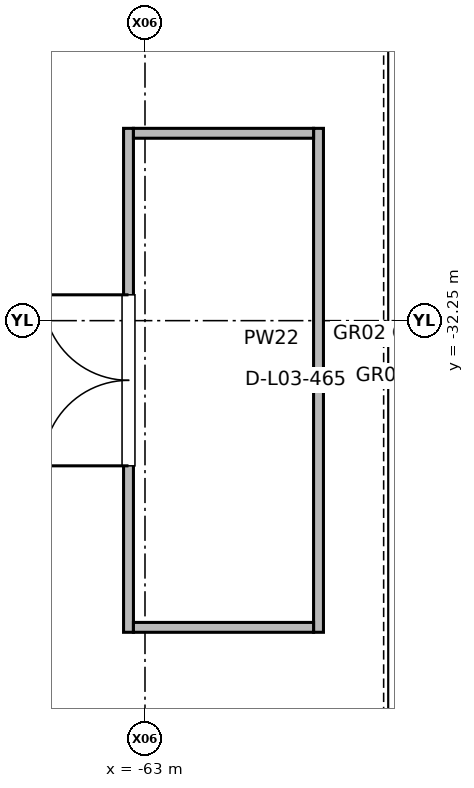
"""IFC4 building model, lengths in metres.
Left out: names, types, materials, properties, quantities, classifications, styles, units other than length and angle.
Written with IfcOpenShell. Run it as: python <this file> out.ifc"""

import sys

from ifc_helpers import new_model, si_unit, direction, frame, frame_2d, origin, place, context, subcontext, project, spatial, rectangle, extrude, element, fill, save


model = new_model("IFC4")
c1 = context("Model", 3, precision=1e-05, world=origin(), true_north=direction((0.0, 1.0)))
c2 = subcontext(c1, "Body", "Model", "MODEL_VIEW")
j1 = project(units=[si_unit("LENGTHUNIT", "METRE"), si_unit("PLANEANGLEUNIT", "RADIAN")], contexts=[c1])
p1 = place(None, origin())
s1 = spatial("IfcSite", under=j1, at=p1, CompositionType="ELEMENT")
p2 = place(p1, origin())
s2 = spatial("IfcBuilding", under=s1, at=p2, CompositionType="ELEMENT")
p3 = place(p2, frame((0.0, 0.0, 11.4)))
s3 = spatial("IfcBuildingStorey", under=s2, at=p3, CompositionType="ELEMENT", Elevation=11.4)
p4 = place(p3, frame((-63.217, -36.35, 0.0), z_axis=(0.0, 0.0, 1.0), x_axis=(0.0, 1.0, 0.0)))
e1 = element("IfcWall", 1, at=p4, inside=s3, PredefinedType="PARTITIONING", context=c2, shape_type="SweptSolid", body=[
    extrude(rectangle(XDim=6.63, YDim=0.13, at=frame_2d((3.315, 0.0))), origin(), (0.0, 0.0, 1.0), 2.755),
])
p5 = place(p4, frame((2.19, 0.0, 0.0)))
e2 = element("IfcOpeningElement", 2, at=p5, cuts=e1, PredefinedType="OPENING", context=c2, shape_type="SweptSolid", body=[
    extrude(rectangle(XDim=2.25, YDim=2.45, at=frame_2d((1.125, 1.225))), frame((0.0, 0.075, 0.0), z_axis=(0.0, -1.0, 0.0), x_axis=(1.0, 0.0, 0.0)), (0.0, 0.0, 1.0), 0.15),
])
p6 = place(p3, frame((-60.717, -36.35, 0.0), z_axis=(0.0, 0.0, 1.0), x_axis=(0.0, 1.0, 0.0)))
e3 = element("IfcWall", 3, at=p6, inside=s3, PredefinedType="PARTITIONING", context=c2, shape_type="SweptSolid", body=[
    extrude(rectangle(XDim=6.63, YDim=0.13, at=frame_2d((3.315, 0.0))), origin(), (0.0, 0.0, 1.0), 3.82),
])
for number, where, z_axis, x_axis in (
    (4, (-63.152, -36.285, 0.0), (0.0, 0.0, 1.0), (1.0, 0.0, 0.0)),
    (5, (-63.152, -29.785, 0.0), (0.0, 0.0, 1.0), (1.0, 0.0, 0.0)),
):
    element("IfcWall", number, at=place(p3, frame(where, z_axis=z_axis, x_axis=x_axis)), inside=s3, PredefinedType="PARTITIONING", context=c2, shape_type="SweptSolid", body=[
        extrude(rectangle(XDim=2.37, YDim=0.13, at=frame_2d((1.185, 0.0))), origin(), (0.0, 0.0, 1.0), 2.755),
    ])
p7 = place(p5, origin())
e6 = element("IfcDoor", 6, at=p7, inside=s3, OperationType="DOUBLE_DOOR_SINGLE_SWING", PredefinedType="DOOR", context=c2, shape_type="SweptSolid", body=[
    extrude(rectangle(XDim=2.25, YDim=2.45, at=frame_2d((1.125, 1.225))), frame((0.0, 0.025, 0.0), z_axis=(0.0, -1.0, 0.0), x_axis=(1.0, 0.0, 0.0)), (0.0, 0.0, 1.0), 0.05),
])
fill(e2, e6)
save(model, sys.argv[1])
